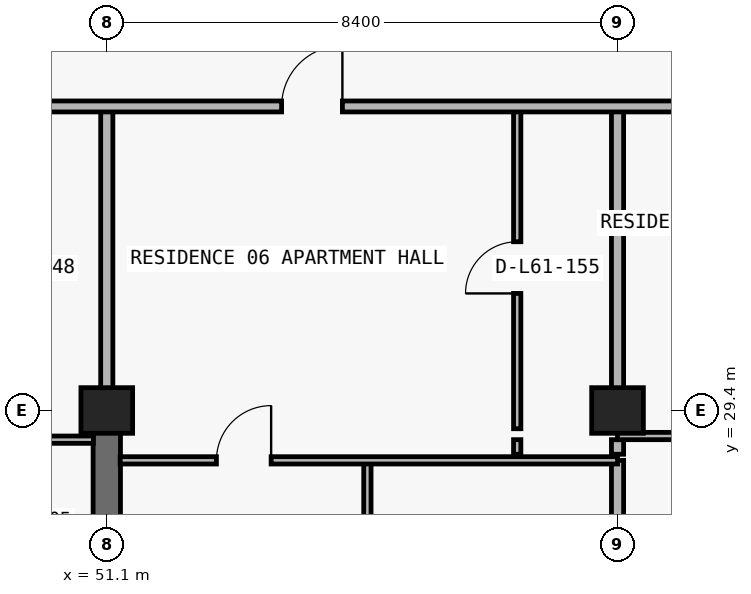
"""IFC4 building model, lengths in metres.
Left out: names, types, materials, properties, quantities, classifications, styles, units other than length and angle.
Written with IfcOpenShell. Run it as: python <this file> out.ifc"""

import sys

from ifc_helpers import new_model, si_unit, direction, frame, frame_2d, origin, origin_2d, place, context, subcontext, project, spatial, rectangle, extrude, element, fill, save


model = new_model("IFC4")
c1 = context("Model", 3, precision=1e-05, world=origin(), true_north=direction((0.0, 1.0)))
c2 = subcontext(c1, "Body", "Model", "MODEL_VIEW")
j1 = project(units=[si_unit("LENGTHUNIT", "METRE"), si_unit("PLANEANGLEUNIT", "RADIAN")], contexts=[c1])
p1 = place(None, origin())
s1 = spatial("IfcSite", under=j1, at=p1, CompositionType="ELEMENT")
p2 = place(p1, origin())
s2 = spatial("IfcBuilding", under=s1, at=p2, CompositionType="ELEMENT")
p3 = place(p2, frame((0.0, 0.0, 218.1)))
s3 = spatial("IfcBuildingStorey", under=s2, at=p3, CompositionType="ELEMENT", Elevation=218.1)
for number, where, z_axis, x_axis in (
    (1, (51.1, 29.4, 0.0), (0.0, 0.0, 1.0), (1.0, 0.0, 0.0)),
    (2, (59.5, 29.4, 0.0), (0.0, 0.0, 1.0), (1.0, 0.0, 0.0)),
):
    element("IfcColumn", number, at=place(p3, frame(where, z_axis=z_axis, x_axis=x_axis)), inside=s3, PredefinedType="COLUMN", context=c2, shape_type="SweptSolid", body=[
        extrude(rectangle(XDim=0.85, YDim=0.75, at=origin_2d()), origin(), (0.0, 0.0, 1.0), 3.0),
    ])
p4 = place(p3, frame((51.1, 20.8, 0.0), z_axis=(0.0, 0.0, 1.0), x_axis=(0.0, 1.0, 0.0)))
e3 = element("IfcWall", 3, at=p4, inside=s3, PredefinedType="SHEAR", context=c2, shape_type="SweptSolid", body=[
    extrude(rectangle(XDim=8.6, YDim=0.45, at=frame_2d((4.3, 0.0))), origin(), (0.0, 0.0, 1.0), 3.0),
])
p5 = place(p3, frame((51.1, 29.405, 0.0), z_axis=(0.0, 0.0, 1.0), x_axis=(0.0, 1.0, 0.0)))
e4 = element("IfcWall", 4, at=p5, inside=s3, PredefinedType="PARTITIONING", context=c2, shape_type="SweptSolid", body=[
    extrude(rectangle(XDim=4.995, YDim=0.2, at=frame_2d((2.498, 0.0))), origin(), (0.0, 0.0, 1.0), 2.285),
])
p6 = place(p3, frame((55.386, 23.89, 0.0), z_axis=(0.0, 0.0, 1.0), x_axis=(0.0, 1.0, 0.0)))
e5 = element("IfcWall", 5, at=p6, inside=s3, PredefinedType="PARTITIONING", context=c2, shape_type="SweptSolid", body=[
    extrude(rectangle(XDim=4.69, YDim=0.12, at=frame_2d((2.345, 0.0))), origin(), (0.0, 0.0, 1.0), 2.449),
])
p7 = place(p6, frame((1.895, 0.0, 0.0)))
e6 = element("IfcOpeningElement", 6, at=p7, cuts=e5, PredefinedType="OPENING", context=c2, shape_type="SweptSolid", body=[
    extrude(rectangle(XDim=0.9, YDim=2.15, at=frame_2d((0.45, 1.075))), frame((0.0, 0.07, 0.0), z_axis=(0.0, -1.0, 0.0), x_axis=(1.0, 0.0, 0.0)), (0.0, 0.0, 1.0), 0.14),
])
p8 = place(p3, frame((57.85, 28.68, 0.0), z_axis=(0.0, 0.0, 1.0), x_axis=(0.0, 1.0, 0.0)))
e7 = element("IfcWall", 7, at=p8, inside=s3, PredefinedType="PARTITIONING", context=c2, shape_type="SweptSolid", body=[
    extrude(rectangle(XDim=0.24, YDim=0.12, at=frame_2d((0.12, 0.0))), origin(), (0.0, 0.0, 1.0), 3.0),
])
p9 = place(p3, frame((57.85, 29.1, 0.0), z_axis=(0.0, 0.0, 1.0), x_axis=(0.0, 1.0, 0.0)))
e8 = element("IfcWall", 8, at=p9, inside=s3, PredefinedType="PARTITIONING", context=c2, shape_type="SweptSolid", body=[
    extrude(rectangle(XDim=5.3, YDim=0.12, at=frame_2d((2.65, 0.0))), origin(), (0.0, 0.0, 1.0), 3.0),
])
p10 = place(p9, frame((2.225, 0.0, 0.0)))
e9 = element("IfcOpeningElement", 9, at=p10, cuts=e8, PredefinedType="OPENING", context=c2, shape_type="SweptSolid", body=[
    extrude(rectangle(XDim=0.85, YDim=2.1, at=frame_2d((0.425, 1.05))), frame((0.0, 0.07, 0.0), z_axis=(0.0, -1.0, 0.0), x_axis=(1.0, 0.0, 0.0)), (0.0, 0.0, 1.0), 0.14),
])
p11 = place(p3, frame((59.5, 23.89, 0.0), z_axis=(0.0, 0.0, 1.0), x_axis=(0.0, 1.0, 0.0)))
e10 = element("IfcWall", 10, at=p11, inside=s3, PredefinedType="PARTITIONING", context=c2, shape_type="SweptSolid", body=[
    extrude(rectangle(XDim=4.69, YDim=0.2, at=frame_2d((2.345, 0.0))), origin(), (0.0, 0.0, 1.0), 2.213),
])
p12 = place(p3, frame((59.5, 28.68, 0.0), z_axis=(0.0, 0.0, 1.0), x_axis=(0.0, 1.0, 0.0)))
e11 = element("IfcWall", 11, at=p12, inside=s3, PredefinedType="PARTITIONING", context=c2, shape_type="SweptSolid", body=[
    extrude(rectangle(XDim=0.24, YDim=0.2, at=frame_2d((0.12, 0.0))), origin(), (0.0, 0.0, 1.0), 2.213),
])
p13 = place(p3, frame((59.5, 29.1, 0.0), z_axis=(0.0, 0.0, 1.0), x_axis=(0.0, 1.0, 0.0)))
e12 = element("IfcWall", 12, at=p13, inside=s3, PredefinedType="PARTITIONING", context=c2, shape_type="SweptSolid", body=[
    extrude(rectangle(XDim=5.3, YDim=0.2, at=frame_2d((2.65, 0.0))), origin(), (0.0, 0.0, 1.0), 2.213),
])
p14 = place(p3, frame((51.32, 28.58, 0.0), z_axis=(0.0, 0.0, 1.0), x_axis=(1.0, 0.0, 0.0)))
e13 = element("IfcWall", 13, at=p14, inside=s3, PredefinedType="PARTITIONING", context=c2, shape_type="SweptSolid", body=[
    extrude(rectangle(XDim=8.18, YDim=0.12, at=frame_2d((4.09, 0.0))), origin(), (0.0, 0.0, 1.0), 3.0),
])
p15 = place(p14, frame((1.583, 0.0, 0.0)))
e14 = element("IfcOpeningElement", 14, at=p15, cuts=e13, PredefinedType="OPENING", context=c2, shape_type="SweptSolid", body=[
    extrude(rectangle(XDim=0.9, YDim=2.15, at=frame_2d((0.45, 1.075))), frame((0.0, 0.07, 0.0), z_axis=(0.0, -1.0, 0.0), x_axis=(1.0, 0.0, 0.0)), (0.0, 0.0, 1.0), 0.14),
])
p16 = place(p3, frame((42.7, 28.92, 0.0), z_axis=(0.0, 0.0, 1.0), x_axis=(1.0, 0.0, 0.0)))
e15 = element("IfcWall", 15, at=p16, inside=s3, PredefinedType="PARTITIONING", context=c2, shape_type="SweptSolid", body=[
    extrude(rectangle(XDim=8.18, YDim=0.12, at=frame_2d((4.09, 0.0))), origin(), (0.0, 0.0, 1.0), 3.0),
])
p17 = place(p16, frame((1.943, 0.0, 0.0)))
e16 = element("IfcOpeningElement", 16, at=p17, cuts=e15, PredefinedType="OPENING", context=c2, shape_type="SweptSolid", body=[
    extrude(rectangle(XDim=0.9, YDim=2.15, at=frame_2d((0.45, 1.075))), frame((0.0, 0.07, 0.0), z_axis=(0.0, -1.0, 0.0), x_axis=(1.0, 0.0, 0.0)), (0.0, 0.0, 1.0), 0.14),
])
p18 = place(p3, frame((59.5, 28.98, 0.0), z_axis=(0.0, 0.0, 1.0), x_axis=(1.0, 0.0, 0.0)))
e17 = element("IfcWall", 17, at=p18, inside=s3, PredefinedType="PARTITIONING", context=c2, shape_type="SweptSolid", body=[
    extrude(rectangle(XDim=8.2, YDim=0.12, at=frame_2d((4.1, 0.0))), origin(), (0.0, 0.0, 1.0), 3.0),
])
p19 = place(p18, frame((1.764, 0.0, 0.0)))
e18 = element("IfcOpeningElement", 18, at=p19, cuts=e17, PredefinedType="OPENING", context=c2, shape_type="SweptSolid", body=[
    extrude(rectangle(XDim=0.9, YDim=2.15, at=frame_2d((0.45, 1.075))), frame((0.0, 0.07, 0.0), z_axis=(0.0, -1.0, 0.0), x_axis=(1.0, 0.0, 0.0)), (0.0, 0.0, 1.0), 0.14),
])
p20 = place(p3, frame((39.28, 34.4, 0.0), z_axis=(0.0, 0.0, 1.0), x_axis=(1.0, 0.0, 0.0)))
e19 = element("IfcWall", 19, at=p20, inside=s3, PredefinedType="PARTITIONING", context=c2, shape_type="SweptSolid", body=[
    extrude(rectangle(XDim=28.42, YDim=0.18, at=frame_2d((14.21, 0.0))), origin(), (0.0, 0.0, 1.0), 3.0),
])
p21 = place(p20, frame((6.18, 0.0, 0.0)))
e20 = element("IfcOpeningElement", 20, at=p21, cuts=e19, PredefinedType="OPENING", context=c2, shape_type="SweptSolid", body=[
    extrude(rectangle(XDim=1.0, YDim=2.2, at=frame_2d((0.5, 1.1))), frame((0.0, 0.1, 0.0), z_axis=(0.0, -1.0, 0.0), x_axis=(1.0, 0.0, 0.0)), (0.0, 0.0, 1.0), 0.2),
])
p22 = place(p20, frame((14.695, 0.0, 0.0)))
e21 = element("IfcOpeningElement", 21, at=p22, cuts=e19, PredefinedType="OPENING", context=c2, shape_type="SweptSolid", body=[
    extrude(rectangle(XDim=1.0, YDim=2.2, at=frame_2d((0.5, 1.1))), frame((0.0, 0.1, 0.0), z_axis=(0.0, -1.0, 0.0), x_axis=(1.0, 0.0, 0.0)), (0.0, 0.0, 1.0), 0.2),
])
p23 = place(p20, frame((22.87, 0.0, 0.0)))
e22 = element("IfcOpeningElement", 22, at=p23, cuts=e19, PredefinedType="OPENING", context=c2, shape_type="SweptSolid", body=[
    extrude(rectangle(XDim=1.0, YDim=2.2, at=frame_2d((0.5, 1.1))), frame((0.0, 0.1, 0.0), z_axis=(0.0, -1.0, 0.0), x_axis=(1.0, 0.0, 0.0)), (0.0, 0.0, 1.0), 0.2),
])
p24 = place(p22, origin())
e23 = element("IfcDoor", 23, at=p24, inside=s3, OperationType="SINGLE_SWING_RIGHT", PredefinedType="DOOR", context=c2, shape_type="SweptSolid", body=[
    extrude(rectangle(XDim=1.0, YDim=2.2, at=frame_2d((0.5, 1.1))), frame((0.0, 0.025, 0.0), z_axis=(0.0, -1.0, 0.0), x_axis=(1.0, 0.0, 0.0)), (0.0, 0.0, 1.0), 0.05),
])
fill(e21, e23)
p25 = place(p10, origin())
e24 = element("IfcDoor", 24, at=p25, inside=s3, OperationType="SINGLE_SWING_LEFT", PredefinedType="DOOR", context=c2, shape_type="SweptSolid", body=[
    extrude(rectangle(XDim=0.85, YDim=2.1, at=frame_2d((0.425, 1.05))), frame((0.0, 0.025, 0.0), z_axis=(0.0, -1.0, 0.0), x_axis=(1.0, 0.0, 0.0)), (0.0, 0.0, 1.0), 0.05),
])
fill(e9, e24)
p26 = place(p15, origin())
e25 = element("IfcDoor", 25, at=p26, inside=s3, OperationType="SINGLE_SWING_RIGHT", PredefinedType="DOOR", context=c2, shape_type="SweptSolid", body=[
    extrude(rectangle(XDim=0.9, YDim=2.15, at=frame_2d((0.45, 1.075))), frame((0.0, 0.025, 0.0), z_axis=(0.0, -1.0, 0.0), x_axis=(1.0, 0.0, 0.0)), (0.0, 0.0, 1.0), 0.05),
])
fill(e14, e25)
save(model, sys.argv[1])
